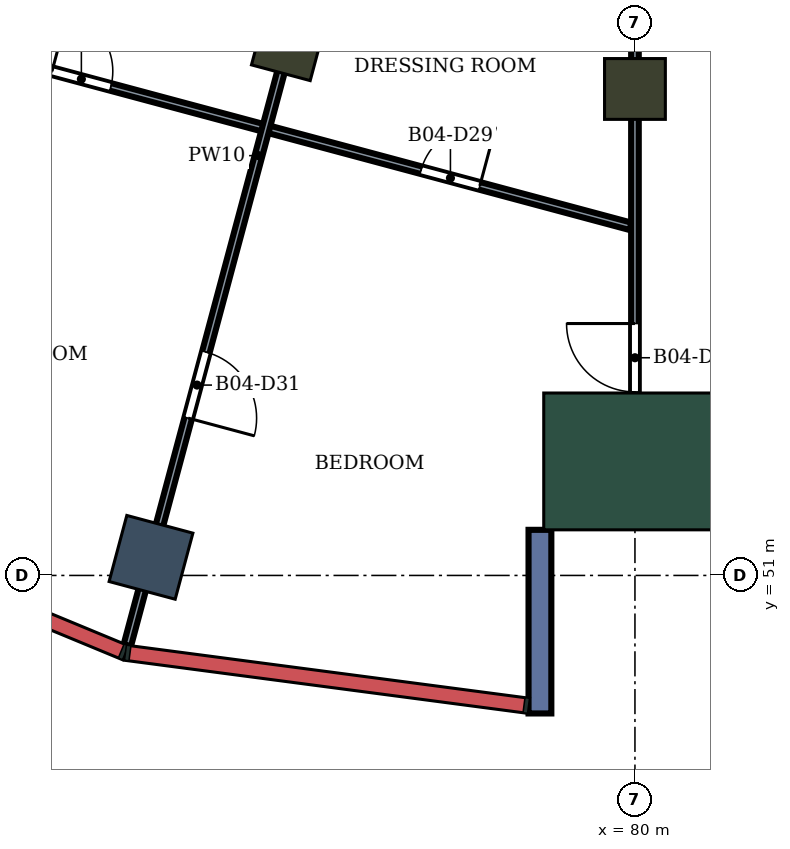
"""IFC4 building model, lengths in metres.
Left out: names, types, materials, properties, quantities, classifications, styles, units other than length and angle.
Written with IfcOpenShell. Run it as: python <this file> out.ifc"""

import sys

from ifc_helpers import new_model, si_unit, direction, frame, frame_2d, origin, origin_2d, place, context, subcontext, project, spatial, rectangle, extrude, element, fill, save


model = new_model("IFC4")
c1 = context("Model", 3, precision=1e-05, world=origin(), true_north=direction((0.0, 1.0)))
c2 = subcontext(c1, "Body", "Model", "MODEL_VIEW")
j1 = project(units=[si_unit("LENGTHUNIT", "METRE"), si_unit("PLANEANGLEUNIT", "RADIAN")], contexts=[c1])
p1 = place(None, origin())
s1 = spatial("IfcSite", under=j1, at=p1, CompositionType="ELEMENT")
p2 = place(p1, origin())
s2 = spatial("IfcBuilding", under=s1, at=p2, CompositionType="ELEMENT")
p3 = place(p2, frame((0.0, 0.0, 249.9)))
s3 = spatial("IfcBuildingStorey", under=s2, at=p3, CompositionType="ELEMENT", Elevation=249.9)
p4 = place(p3, frame((73.633, 51.238, 0.0), z_axis=(0.0, 0.0, 1.0), x_axis=(-0.258819045103, -0.965925826289, 0.0)))
e1 = element("IfcColumn", 1, at=p4, inside=s3, PredefinedType="COLUMN", context=c2, shape_type="SweptSolid", body=[
    extrude(rectangle(XDim=0.9, YDim=0.9, at=origin_2d()), origin(), (0.0, 0.0, 1.0), 4.2),
])
for number, where, z_axis, x_axis in (
    (2, (75.445, 58.0, 0.0), (0.0, 0.0, 1.0), (-0.259, -0.966, 0.0)),
    (3, (80.0, 57.4, 0.0), (0.0, 0.0, 1.0), (0.0, -1.0, 0.0)),
):
    element("IfcColumn", number, at=place(p3, frame(where, z_axis=z_axis, x_axis=x_axis)), inside=s3, PredefinedType="COLUMN", context=c2, shape_type="SweptSolid", body=[
        extrude(rectangle(XDim=0.8, YDim=0.8, at=origin_2d()), origin(), (0.0, 0.0, 1.0), 4.2),
    ])
p5 = place(p3, frame((80.0, 52.5, 0.0), z_axis=(0.0, 0.0, 1.0), x_axis=(0.0, -1.0, 0.0)))
e4 = element("IfcColumn", 4, at=p5, inside=s3, PredefinedType="COLUMN", context=c2, shape_type="SweptSolid", body=[
    extrude(rectangle(XDim=1.8, YDim=2.4, at=origin_2d()), origin(), (0.0, 0.0, 1.0), 4.2),
])
p6 = place(p3, frame((78.75, 51.6, 0.0), z_axis=(0.0, 0.0, 1.0), x_axis=(0.0, -1.0, 0.0)))
e5 = element("IfcWall", 5, at=p6, inside=s3, PredefinedType="NOTDEFINED", context=c2, shape_type="SweptSolid", body=[
    extrude(rectangle(XDim=2.416, YDim=0.3, at=frame_2d((1.208, 0.0))), origin(), (0.0, 0.0, 1.0), 4.2),
])
p7 = place(p3, frame((67.101, 52.659, 0.0), z_axis=(0.0, 0.0, 1.0), x_axis=(0.499999276258, 0.866025821636, 0.0)))
e6 = element("IfcWall", 6, at=p7, inside=s3, PredefinedType="PARTITIONING", context=c2, shape_type="SweptSolid", body=[
    extrude(rectangle(XDim=12.876, YDim=0.1, at=frame_2d((6.438, 0.0))), origin(), (0.0, 0.0, 1.0), 3.75),
])
p8 = place(p7, frame((2.763, 0.0, 0.0)))
e7 = element("IfcOpeningElement", 7, at=p8, cuts=e6, PredefinedType="OPENING", context=c2, shape_type="SweptSolid", body=[
    extrude(rectangle(XDim=0.9, YDim=2.1, at=frame_2d((0.45, 1.05))), frame((0.0, 0.06, 0.0), z_axis=(0.0, -1.0, 0.0), x_axis=(1.0, 0.0, 0.0)), (0.0, 0.0, 1.0), 0.12),
])
p9 = place(p3, frame((70.347, 58.165, 0.0), z_axis=(0.0, 0.0, 1.0), x_axis=(0.965891429463, -0.2589473817, 0.0)))
e8 = element("IfcWall", 8, at=p9, inside=s3, PredefinedType="PARTITIONING", context=c2, shape_type="SweptSolid", body=[
    extrude(rectangle(XDim=9.934, YDim=0.1, at=frame_2d((4.967, 0.0))), origin(), (0.0, 0.0, 1.0), 3.75),
])
p10 = place(p9, frame((7.081, 0.0, 0.0)))
e9 = element("IfcOpeningElement", 9, at=p10, cuts=e8, PredefinedType="OPENING", context=c2, shape_type="SweptSolid", body=[
    extrude(rectangle(XDim=0.8, YDim=2.1, at=frame_2d((0.4, 1.05))), frame((0.0, 0.06, 0.0), z_axis=(0.0, -1.0, 0.0), x_axis=(1.0, 0.0, 0.0)), (0.0, 0.0, 1.0), 0.12),
])
p11 = place(p9, frame((2.054, 0.0, 0.0)))
e10 = element("IfcOpeningElement", 10, at=p11, cuts=e8, PredefinedType="OPENING", context=c2, shape_type="SweptSolid", body=[
    extrude(rectangle(XDim=0.8, YDim=2.1, at=frame_2d((0.4, 1.05))), frame((0.0, 0.06, 0.0), z_axis=(0.0, -1.0, 0.0), x_axis=(1.0, 0.0, 0.0)), (0.0, 0.0, 1.0), 0.12),
])
p12 = place(p3, frame((73.322, 50.081, 0.0), z_axis=(0.0, 0.0, 1.0), x_axis=(0.258871185824, 0.965911853717, 0.0)))
e11 = element("IfcWall", 11, at=p12, inside=s3, PredefinedType="PARTITIONING", context=c2, shape_type="SweptSolid", body=[
    extrude(rectangle(XDim=13.338, YDim=0.1, at=frame_2d((6.669, 0.0))), origin(), (0.0, 0.0, 1.0), 3.75),
])
p13 = place(p12, frame((3.094, 0.0, 0.0)))
e12 = element("IfcOpeningElement", 12, at=p13, cuts=e11, PredefinedType="OPENING", context=c2, shape_type="SweptSolid", body=[
    extrude(rectangle(XDim=0.9, YDim=2.1, at=frame_2d((0.45, 1.05))), frame((0.0, 0.06, 0.0), z_axis=(0.0, -1.0, 0.0), x_axis=(1.0, 0.0, 0.0)), (0.0, 0.0, 1.0), 0.12),
])
p14 = place(p3, frame((80.0, 51.8, 0.0), z_axis=(0.0, 0.0, 1.0), x_axis=(0.0, 1.0, 0.0)))
e13 = element("IfcWall", 13, at=p14, inside=s3, PredefinedType="PARTITIONING", context=c2, shape_type="SweptSolid", body=[
    extrude(rectangle(XDim=10.404, YDim=0.1, at=frame_2d((5.202, 0.0))), origin(), (0.0, 0.0, 1.0), 3.75),
])
p15 = place(p14, frame((1.614, 0.0, 0.0)))
e14 = element("IfcOpeningElement", 14, at=p15, cuts=e13, PredefinedType="OPENING", context=c2, shape_type="SweptSolid", body=[
    extrude(rectangle(XDim=0.9, YDim=2.1, at=frame_2d((0.45, 1.05))), frame((0.0, 0.06, 0.0), z_axis=(0.0, -1.0, 0.0), x_axis=(1.0, 0.0, 0.0)), (0.0, 0.0, 1.0), 0.12),
])
p16 = place(p14, frame((7.872, 0.0, 0.0)))
e15 = element("IfcOpeningElement", 15, at=p16, cuts=e13, PredefinedType="OPENING", context=c2, shape_type="SweptSolid", body=[
    extrude(rectangle(XDim=0.8, YDim=2.1, at=frame_2d((0.4, 1.05))), frame((0.0, 0.06, 0.0), z_axis=(0.0, -1.0, 0.0), x_axis=(1.0, 0.0, 0.0)), (0.0, 0.0, 1.0), 0.12),
])
p17 = place(p15, origin())
e16 = element("IfcDoor", 16, at=p17, inside=s3, OperationType="SINGLE_SWING_RIGHT", PredefinedType="DOOR", context=c2, shape_type="SweptSolid", body=[
    extrude(rectangle(XDim=0.9, YDim=2.1, at=frame_2d((0.45, 1.05))), frame((0.0, 0.025, 0.0), z_axis=(0.0, -1.0, 0.0), x_axis=(1.0, 0.0, 0.0)), (0.0, 0.0, 1.0), 0.05),
])
fill(e14, e16)
p18 = place(p10, origin())
e17 = element("IfcDoor", 17, at=p18, inside=s3, OperationType="SINGLE_SWING_RIGHT", PredefinedType="DOOR", context=c2, shape_type="SweptSolid", body=[
    extrude(rectangle(XDim=0.8, YDim=2.1, at=frame_2d((0.4, 1.05))), frame((0.0, 0.025, 0.0), z_axis=(0.0, -1.0, 0.0), x_axis=(1.0, 0.0, 0.0)), (0.0, 0.0, 1.0), 0.05),
])
fill(e9, e17)
p19 = place(p13, frame((0.9, 0.0, 0.0), z_axis=(0.0, 0.0, 1.0), x_axis=(-1.0, 0.0, 0.0)))
e18 = element("IfcDoor", 18, at=p19, inside=s3, OperationType="SINGLE_SWING_RIGHT", PredefinedType="DOOR", context=c2, shape_type="SweptSolid", body=[
    extrude(rectangle(XDim=0.9, YDim=2.1, at=frame_2d((0.45, 1.05))), frame((0.0, 0.025, 0.0), z_axis=(0.0, -1.0, 0.0), x_axis=(1.0, 0.0, 0.0)), (0.0, 0.0, 1.0), 0.05),
])
fill(e12, e18)
p20 = place(p11, origin())
e19 = element("IfcDoor", 19, at=p20, inside=s3, OperationType="SINGLE_SWING_LEFT", PredefinedType="DOOR", context=c2, shape_type="SweptSolid", body=[
    extrude(rectangle(XDim=0.8, YDim=2.1, at=frame_2d((0.4, 1.05))), frame((0.0, 0.025, 0.0), z_axis=(0.0, -1.0, 0.0), x_axis=(1.0, 0.0, 0.0)), (0.0, 0.0, 1.0), 0.05),
])
fill(e10, e19)
save(model, sys.argv[1])
